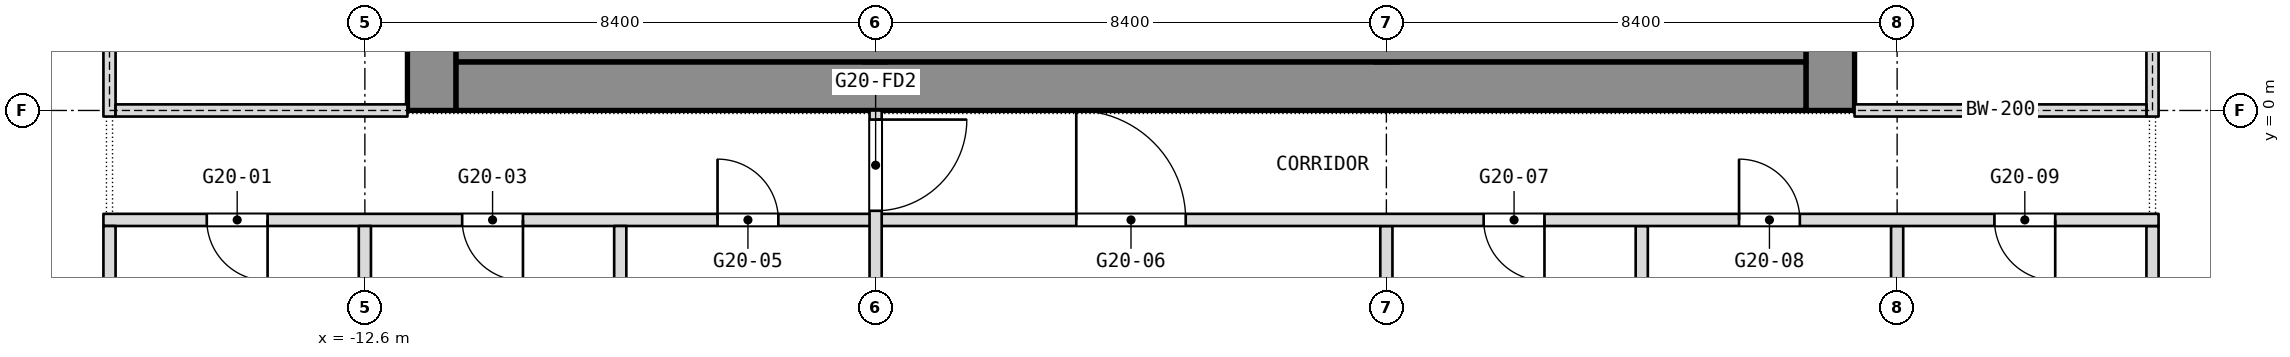
"""IFC4 building model, lengths in metres.
Left out: names, types, materials, properties, quantities, classifications, styles, units other than length and angle.
Written with IfcOpenShell. Run it as: python <this file> out.ifc"""

import sys

from ifc_helpers import new_model, si_unit, direction, frame, frame_2d, origin, place, context, subcontext, project, spatial, rectangle, extrude, element, fill, save


model = new_model("IFC4")
c1 = context("Model", 3, precision=1e-05, world=origin(), true_north=direction((0.0, 1.0)))
c2 = subcontext(c1, "Body", "Model", "MODEL_VIEW")
j1 = project(units=[si_unit("LENGTHUNIT", "METRE"), si_unit("PLANEANGLEUNIT", "RADIAN")], contexts=[c1])
p1 = place(None, origin())
s1 = spatial("IfcSite", under=j1, at=p1, CompositionType="ELEMENT")
p2 = place(p1, origin())
s2 = spatial("IfcBuilding", under=s1, at=p2, CompositionType="ELEMENT")
p3 = place(p2, frame((0.0, 0.0, 238.1)))
s3 = spatial("IfcBuildingStorey", under=s2, at=p3, CompositionType="ELEMENT", Elevation=238.1)
p4 = place(p3, frame((11.5, 0.0, 0.0), z_axis=(0.0, 0.0, 1.0), x_axis=(0.0, 1.0, 0.0)))
e1 = element("IfcWall", 1, at=p4, inside=s3, PredefinedType="SHEAR", context=c2, shape_type="SweptSolid", body=[
    extrude(rectangle(XDim=16.8, YDim=0.8, at=frame_2d((8.4, 0.0))), origin(), (0.0, 0.0, 1.0), 3.6),
])
p5 = place(p4, frame((2.3, 0.0, 0.0)))
e2 = element("IfcOpeningElement", 2, at=p5, cuts=e1, PredefinedType="OPENING", context=c2, shape_type="SweptSolid", body=[
    extrude(rectangle(XDim=1.1, YDim=2.1, at=frame_2d((0.55, 1.05))), frame((0.0, 0.4, 0.0), z_axis=(0.0, -1.0, 0.0), x_axis=(1.0, 0.0, 0.0)), (0.0, 0.0, 1.0), 0.8),
])
p6 = place(p4, frame((4.85, 0.0, 0.0)))
e3 = element("IfcOpeningElement", 3, at=p6, cuts=e1, PredefinedType="OPENING", context=c2, shape_type="SweptSolid", body=[
    extrude(rectangle(XDim=1.1, YDim=2.1, at=frame_2d((0.55, 1.05))), frame((0.0, 0.4, 0.0), z_axis=(0.0, -1.0, 0.0), x_axis=(1.0, 0.0, 0.0)), (0.0, 0.0, 1.0), 0.8),
])
p7 = place(p4, frame((6.825, 0.0, 0.0)))
e4 = element("IfcOpeningElement", 4, at=p7, cuts=e1, PredefinedType="OPENING", context=c2, shape_type="SweptSolid", body=[
    extrude(rectangle(XDim=1.2, YDim=2.1, at=frame_2d((0.6, 1.05))), frame((0.0, 0.4, 0.0), z_axis=(0.0, -1.0, 0.0), x_axis=(1.0, 0.0, 0.0)), (0.0, 0.0, 1.0), 0.8),
])
p8 = place(p4, frame((13.4, 0.0, 0.0)))
e5 = element("IfcOpeningElement", 5, at=p8, cuts=e1, PredefinedType="OPENING", context=c2, shape_type="SweptSolid", body=[
    extrude(rectangle(XDim=1.1, YDim=2.1, at=frame_2d((0.55, 1.05))), frame((0.0, 0.4, 0.0), z_axis=(0.0, -1.0, 0.0), x_axis=(1.0, 0.0, 0.0)), (0.0, 0.0, 1.0), 0.8),
])
p9 = place(p4, frame((10.85, 0.0, 0.0)))
e6 = element("IfcOpeningElement", 6, at=p9, cuts=e1, PredefinedType="OPENING", context=c2, shape_type="SweptSolid", body=[
    extrude(rectangle(XDim=1.1, YDim=2.1, at=frame_2d((0.55, 1.05))), frame((0.0, 0.4, 0.0), z_axis=(0.0, -1.0, 0.0), x_axis=(1.0, 0.0, 0.0)), (0.0, 0.0, 1.0), 0.8),
])
p10 = place(p4, frame((8.775, 0.0, 0.0)))
e7 = element("IfcOpeningElement", 7, at=p10, cuts=e1, PredefinedType="OPENING", context=c2, shape_type="SweptSolid", body=[
    extrude(rectangle(XDim=1.2, YDim=2.1, at=frame_2d((0.6, 1.05))), frame((0.0, 0.4, 0.0), z_axis=(0.0, -1.0, 0.0), x_axis=(1.0, 0.0, 0.0)), (0.0, 0.0, 1.0), 0.8),
])
p11 = place(p3, frame((-11.5, 0.0, 0.0), z_axis=(0.0, 0.0, 1.0), x_axis=(0.0, 1.0, 0.0)))
e8 = element("IfcWall", 8, at=p11, inside=s3, PredefinedType="SHEAR", context=c2, shape_type="SweptSolid", body=[
    extrude(rectangle(XDim=16.8, YDim=0.8, at=frame_2d((8.4, 0.0))), origin(), (0.0, 0.0, 1.0), 3.6),
])
p12 = place(p11, frame((1.837, 0.0, 0.0)))
e9 = element("IfcOpeningElement", 9, at=p12, cuts=e8, PredefinedType="OPENING", context=c2, shape_type="SweptSolid", body=[
    extrude(rectangle(XDim=0.9, YDim=2.1, at=frame_2d((0.45, 1.05))), frame((0.0, 0.4, 0.0), z_axis=(0.0, -1.0, 0.0), x_axis=(1.0, 0.0, 0.0)), (0.0, 0.0, 1.0), 0.8),
])
p13 = place(p11, frame((4.462, 0.0, 0.0)))
e10 = element("IfcOpeningElement", 10, at=p13, cuts=e8, PredefinedType="OPENING", context=c2, shape_type="SweptSolid", body=[
    extrude(rectangle(XDim=0.9, YDim=2.1, at=frame_2d((0.45, 1.05))), frame((0.0, 0.4, 0.0), z_axis=(0.0, -1.0, 0.0), x_axis=(1.0, 0.0, 0.0)), (0.0, 0.0, 1.0), 0.8),
])
p14 = place(p11, frame((6.825, 0.0, 0.0)))
e11 = element("IfcOpeningElement", 11, at=p14, cuts=e8, PredefinedType="OPENING", context=c2, shape_type="SweptSolid", body=[
    extrude(rectangle(XDim=1.2, YDim=2.1, at=frame_2d((0.6, 1.05))), frame((0.0, 0.4, 0.0), z_axis=(0.0, -1.0, 0.0), x_axis=(1.0, 0.0, 0.0)), (0.0, 0.0, 1.0), 0.8),
])
p15 = place(p11, frame((12.3, 0.0, 0.0)))
e12 = element("IfcOpeningElement", 12, at=p15, cuts=e8, PredefinedType="OPENING", context=c2, shape_type="SweptSolid", body=[
    extrude(rectangle(XDim=0.9, YDim=2.1, at=frame_2d((0.45, 1.05))), frame((0.0, 0.4, 0.0), z_axis=(0.0, -1.0, 0.0), x_axis=(1.0, 0.0, 0.0)), (0.0, 0.0, 1.0), 0.8),
])
p16 = place(p11, frame((8.775, 0.0, 0.0)))
e13 = element("IfcOpeningElement", 13, at=p16, cuts=e8, PredefinedType="OPENING", context=c2, shape_type="SweptSolid", body=[
    extrude(rectangle(XDim=1.2, YDim=2.1, at=frame_2d((0.6, 1.05))), frame((0.0, 0.4, 0.0), z_axis=(0.0, -1.0, 0.0), x_axis=(1.0, 0.0, 0.0)), (0.0, 0.0, 1.0), 0.8),
])
p17 = place(p3, frame((-11.1, 0.4, 0.0), z_axis=(0.0, 0.0, 1.0), x_axis=(1.0, 0.0, 0.0)))
e14 = element("IfcWall", 14, at=p17, inside=s3, PredefinedType="SHEAR", context=c2, shape_type="SweptSolid", body=[
    extrude(rectangle(XDim=22.2, YDim=0.8, at=frame_2d((11.1, 0.0))), origin(), (0.0, 0.0, 1.0), 3.6),
])
p18 = place(p3, frame((-4.2, 0.8, 0.0), z_axis=(0.0, 0.0, 1.0), x_axis=(0.0, 1.0, 0.0)))
e15 = element("IfcWall", 15, at=p18, inside=s3, PredefinedType="SHEAR", context=c2, shape_type="SweptSolid", body=[
    extrude(rectangle(XDim=15.2, YDim=0.4, at=frame_2d((7.6, 0.0))), origin(), (0.0, 0.0, 1.0), 3.6),
])
p19 = place(p18, frame((8.5, 0.0, 0.0)))
e16 = element("IfcOpeningElement", 16, at=p19, cuts=e15, PredefinedType="OPENING", context=c2, shape_type="SweptSolid", body=[
    extrude(rectangle(XDim=1.2, YDim=2.1, at=frame_2d((0.6, 1.05))), frame((0.0, 0.2, 0.0), z_axis=(0.0, -1.0, 0.0), x_axis=(1.0, 0.0, 0.0)), (0.0, 0.0, 1.0), 0.4),
])
p20 = place(p3, frame((4.2, 0.8, 0.0), z_axis=(0.0, 0.0, 1.0), x_axis=(0.0, 1.0, 0.0)))
e17 = element("IfcWall", 17, at=p20, inside=s3, PredefinedType="SHEAR", context=c2, shape_type="SweptSolid", body=[
    extrude(rectangle(XDim=15.2, YDim=0.4, at=frame_2d((7.6, 0.0))), origin(), (0.0, 0.0, 1.0), 3.6),
])
p21 = place(p20, frame((5.95, 0.0, 0.0)))
e18 = element("IfcOpeningElement", 18, at=p21, cuts=e17, PredefinedType="OPENING", context=c2, shape_type="SweptSolid", body=[
    extrude(rectangle(XDim=1.2, YDim=2.1, at=frame_2d((0.6, 1.05))), frame((0.0, 0.2, 0.0), z_axis=(0.0, -1.0, 0.0), x_axis=(1.0, 0.0, 0.0)), (0.0, 0.0, 1.0), 0.4),
])
for number, where, z_axis, x_axis in (
    (19, (16.8, -7.8, 0.0), (0.0, 0.0, 1.0), (0.0, 1.0, 0.0)),
    (20, (12.6, -7.8, 0.0), (0.0, 0.0, 1.0), (0.0, 1.0, 0.0)),
):
    element("IfcWall", number, at=place(p3, frame(where, z_axis=z_axis, x_axis=x_axis)), inside=s3, PredefinedType="PARTITIONING", context=c2, shape_type="SweptSolid", body=[
        extrude(rectangle(XDim=5.9, YDim=0.2, at=frame_2d((2.95, 0.0))), origin(), (0.0, 0.0, 1.0), 3.34),
    ])
p22 = place(p3, frame((8.4, -8.0, 0.0), z_axis=(0.0, 0.0, 1.0), x_axis=(0.0, 1.0, 0.0)))
e21 = element("IfcWall", 21, at=p22, inside=s3, PredefinedType="PARTITIONING", context=c2, shape_type="SweptSolid", body=[
    extrude(rectangle(XDim=6.1, YDim=0.2, at=frame_2d((3.05, 0.0))), origin(), (0.0, 0.0, 1.0), 3.34),
])
p23 = place(p3, frame((4.2, -11.6, 0.0), z_axis=(0.0, 0.0, 1.0), x_axis=(0.0, 1.0, 0.0)))
e22 = element("IfcWall", 22, at=p23, inside=s3, PredefinedType="PARTITIONING", context=c2, shape_type="SweptSolid", body=[
    extrude(rectangle(XDim=9.7, YDim=0.2, at=frame_2d((4.85, 0.0))), origin(), (0.0, 0.0, 1.0), 3.34),
])
p24 = place(p3, frame((-16.9, -1.8, 0.0), z_axis=(0.0, 0.0, 1.0), x_axis=(1.0, 0.0, 0.0)))
e23 = element("IfcWall", 23, at=p24, inside=s3, PredefinedType="PARTITIONING", context=c2, shape_type="SweptSolid", body=[
    extrude(rectangle(XDim=33.8, YDim=0.2, at=frame_2d((16.9, 0.0))), origin(), (0.0, 0.0, 1.0), 3.34),
])
p25 = place(p24, frame((1.7, 0.0, 0.0)))
e24 = element("IfcOpeningElement", 24, at=p25, cuts=e23, PredefinedType="OPENING", context=c2, shape_type="SweptSolid", body=[
    extrude(rectangle(XDim=1.0, YDim=2.1, at=frame_2d((0.5, 1.05))), frame((0.0, 0.1, 0.0), z_axis=(0.0, -1.0, 0.0), x_axis=(1.0, 0.0, 0.0)), (0.0, 0.0, 1.0), 0.2),
])
p26 = place(p24, frame((5.9, 0.0, 0.0)))
e25 = element("IfcOpeningElement", 25, at=p26, cuts=e23, PredefinedType="OPENING", context=c2, shape_type="SweptSolid", body=[
    extrude(rectangle(XDim=1.0, YDim=2.1, at=frame_2d((0.5, 1.05))), frame((0.0, 0.1, 0.0), z_axis=(0.0, -1.0, 0.0), x_axis=(1.0, 0.0, 0.0)), (0.0, 0.0, 1.0), 0.2),
])
p27 = place(p24, frame((10.1, 0.0, 0.0)))
e26 = element("IfcOpeningElement", 26, at=p27, cuts=e23, PredefinedType="OPENING", context=c2, shape_type="SweptSolid", body=[
    extrude(rectangle(XDim=1.0, YDim=2.1, at=frame_2d((0.5, 1.05))), frame((0.0, 0.1, 0.0), z_axis=(0.0, -1.0, 0.0), x_axis=(1.0, 0.0, 0.0)), (0.0, 0.0, 1.0), 0.2),
])
p28 = place(p24, frame((16.0, 0.0, 0.0)))
e27 = element("IfcOpeningElement", 27, at=p28, cuts=e23, PredefinedType="OPENING", context=c2, shape_type="SweptSolid", body=[
    extrude(rectangle(XDim=1.8, YDim=2.1, at=frame_2d((0.9, 1.05))), frame((0.0, 0.1, 0.0), z_axis=(0.0, -1.0, 0.0), x_axis=(1.0, 0.0, 0.0)), (0.0, 0.0, 1.0), 0.2),
])
p29 = place(p24, frame((22.7, 0.0, 0.0)))
e28 = element("IfcOpeningElement", 28, at=p29, cuts=e23, PredefinedType="OPENING", context=c2, shape_type="SweptSolid", body=[
    extrude(rectangle(XDim=1.0, YDim=2.1, at=frame_2d((0.5, 1.05))), frame((0.0, 0.1, 0.0), z_axis=(0.0, -1.0, 0.0), x_axis=(1.0, 0.0, 0.0)), (0.0, 0.0, 1.0), 0.2),
])
p30 = place(p24, frame((26.9, 0.0, 0.0)))
e29 = element("IfcOpeningElement", 29, at=p30, cuts=e23, PredefinedType="OPENING", context=c2, shape_type="SweptSolid", body=[
    extrude(rectangle(XDim=1.0, YDim=2.1, at=frame_2d((0.5, 1.05))), frame((0.0, 0.1, 0.0), z_axis=(0.0, -1.0, 0.0), x_axis=(1.0, 0.0, 0.0)), (0.0, 0.0, 1.0), 0.2),
])
p31 = place(p24, frame((31.1, 0.0, 0.0)))
e30 = element("IfcOpeningElement", 30, at=p31, cuts=e23, PredefinedType="OPENING", context=c2, shape_type="SweptSolid", body=[
    extrude(rectangle(XDim=1.0, YDim=2.1, at=frame_2d((0.5, 1.05))), frame((0.0, 0.1, 0.0), z_axis=(0.0, -1.0, 0.0), x_axis=(1.0, 0.0, 0.0)), (0.0, 0.0, 1.0), 0.2),
])
p32 = place(p3, frame((-4.2, -13.6, 0.0), z_axis=(0.0, 0.0, 1.0), x_axis=(0.0, 1.0, 0.0)))
e31 = element("IfcWall", 31, at=p32, inside=s3, PredefinedType="PARTITIONING", context=c2, shape_type="SweptSolid", body=[
    extrude(rectangle(XDim=13.6, YDim=0.2, at=frame_2d((6.8, 0.0))), origin(), (0.0, 0.0, 1.0), 3.34),
])
p33 = place(p32, frame((11.95, 0.0, 0.0)))
e32 = element("IfcOpeningElement", 32, at=p33, cuts=e31, PredefinedType="OPENING", context=c2, shape_type="SweptSolid", body=[
    extrude(rectangle(XDim=1.5, YDim=2.1, at=frame_2d((0.75, 1.05))), frame((0.0, 0.1, 0.0), z_axis=(0.0, -1.0, 0.0), x_axis=(1.0, 0.0, 0.0)), (0.0, 0.0, 1.0), 0.2),
])
p34 = place(p32, frame((0.25, 0.0, 0.0)))
e33 = element("IfcOpeningElement", 33, at=p34, cuts=e31, PredefinedType="OPENING", context=c2, shape_type="SweptSolid", body=[
    extrude(rectangle(XDim=1.5, YDim=2.1, at=frame_2d((0.75, 1.05))), frame((0.0, 0.1, 0.0), z_axis=(0.0, -1.0, 0.0), x_axis=(1.0, 0.0, 0.0)), (0.0, 0.0, 1.0), 0.2),
])
p35 = place(p3, frame((-8.4, -8.0, 0.0), z_axis=(0.0, 0.0, 1.0), x_axis=(0.0, 1.0, 0.0)))
e34 = element("IfcWall", 34, at=p35, inside=s3, PredefinedType="PARTITIONING", context=c2, shape_type="SweptSolid", body=[
    extrude(rectangle(XDim=6.1, YDim=0.2, at=frame_2d((3.05, 0.0))), origin(), (0.0, 0.0, 1.0), 3.34),
])
p36 = place(p3, frame((-12.6, -7.8, 0.0), z_axis=(0.0, 0.0, 1.0), x_axis=(0.0, 1.0, 0.0)))
e35 = element("IfcWall", 35, at=p36, inside=s3, PredefinedType="PARTITIONING", context=c2, shape_type="SweptSolid", body=[
    extrude(rectangle(XDim=5.9, YDim=0.2, at=frame_2d((2.95, 0.0))), origin(), (0.0, 0.0, 1.0), 3.34),
])
p37 = place(p3, frame((-16.8, -8.0, 0.0), z_axis=(0.0, 0.0, 1.0), x_axis=(0.0, 1.0, 0.0)))
e36 = element("IfcWall", 36, at=p37, inside=s3, PredefinedType="PARTITIONING", context=c2, shape_type="SweptSolid", body=[
    extrude(rectangle(XDim=6.1, YDim=0.2, at=frame_2d((3.05, 0.0))), origin(), (0.0, 0.0, 1.0), 3.34),
])
p38 = place(p3, frame((-11.1, 1.15, 0.0), z_axis=(0.0, 0.0, 1.0), x_axis=(1.0, 0.0, 0.0)))
e37 = element("IfcWall", 37, at=p38, inside=s3, PredefinedType="PARTITIONING", context=c2, shape_type="SweptSolid", body=[
    extrude(rectangle(XDim=22.2, YDim=0.7, at=frame_2d((11.1, 0.0))), origin(), (0.0, 0.0, 1.0), 3.34),
])
p39 = place(p3, frame((-16.8, -0.1, 0.0), z_axis=(0.0, 0.0, 1.0), x_axis=(0.0, 1.0, 0.0)))
e38 = element("IfcWall", 38, at=p39, inside=s3, PredefinedType="PARTITIONING", context=c2, shape_type="SweptSolid", body=[
    extrude(rectangle(XDim=17.0, YDim=0.2, at=frame_2d((8.5, 0.0))), origin(), (0.0, 0.0, 1.0), 3.34),
])
p40 = place(p39, frame((2.2, 0.0, 0.0)))
e39 = element("IfcOpeningElement", 39, at=p40, cuts=e38, PredefinedType="OPENING", context=c2, shape_type="SweptSolid", body=[
    extrude(rectangle(XDim=1.8, YDim=2.1, at=frame_2d((0.9, 1.05))), frame((0.0, 0.1, 0.0), z_axis=(0.0, -1.0, 0.0), x_axis=(1.0, 0.0, 0.0)), (0.0, 0.0, 1.0), 0.2),
])
p41 = place(p39, frame((13.0, 0.0, 0.0)))
e40 = element("IfcOpeningElement", 40, at=p41, cuts=e38, PredefinedType="OPENING", context=c2, shape_type="SweptSolid", body=[
    extrude(rectangle(XDim=1.8, YDim=2.1, at=frame_2d((0.9, 1.05))), frame((0.0, 0.1, 0.0), z_axis=(0.0, -1.0, 0.0), x_axis=(1.0, 0.0, 0.0)), (0.0, 0.0, 1.0), 0.2),
])
p42 = place(p3, frame((-16.7, 0.0, 0.0), z_axis=(0.0, 0.0, 1.0), x_axis=(1.0, 0.0, 0.0)))
e41 = element("IfcWall", 41, at=p42, inside=s3, PredefinedType="PARTITIONING", context=c2, shape_type="SweptSolid", body=[
    extrude(rectangle(XDim=4.8, YDim=0.2, at=frame_2d((2.4, 0.0))), origin(), (0.0, 0.0, 1.0), 2.94),
])
p43 = place(p3, frame((16.8, -0.1, 0.0), z_axis=(0.0, 0.0, 1.0), x_axis=(0.0, 1.0, 0.0)))
e42 = element("IfcWall", 42, at=p43, inside=s3, PredefinedType="PARTITIONING", context=c2, shape_type="SweptSolid", body=[
    extrude(rectangle(XDim=17.0, YDim=0.2, at=frame_2d((8.5, 0.0))), origin(), (0.0, 0.0, 1.0), 3.34),
])
p44 = place(p43, frame((2.2, 0.0, 0.0)))
e43 = element("IfcOpeningElement", 43, at=p44, cuts=e42, PredefinedType="OPENING", context=c2, shape_type="SweptSolid", body=[
    extrude(rectangle(XDim=1.8, YDim=2.1, at=frame_2d((0.9, 1.05))), frame((0.0, 0.1, 0.0), z_axis=(0.0, -1.0, 0.0), x_axis=(1.0, 0.0, 0.0)), (0.0, 0.0, 1.0), 0.2),
])
p45 = place(p43, frame((13.0, 0.0, 0.0)))
e44 = element("IfcOpeningElement", 44, at=p45, cuts=e42, PredefinedType="OPENING", context=c2, shape_type="SweptSolid", body=[
    extrude(rectangle(XDim=1.8, YDim=2.1, at=frame_2d((0.9, 1.05))), frame((0.0, 0.1, 0.0), z_axis=(0.0, -1.0, 0.0), x_axis=(1.0, 0.0, 0.0)), (0.0, 0.0, 1.0), 0.2),
])
p46 = place(p3, frame((11.9, 0.0, 0.0), z_axis=(0.0, 0.0, 1.0), x_axis=(1.0, 0.0, 0.0)))
e45 = element("IfcWall", 45, at=p46, inside=s3, PredefinedType="PARTITIONING", context=c2, shape_type="SweptSolid", body=[
    extrude(rectangle(XDim=4.8, YDim=0.2, at=frame_2d((2.4, 0.0))), origin(), (0.0, 0.0, 1.0), 2.94),
])
p47 = place(p25, origin())
e46 = element("IfcDoor", 46, at=p47, inside=s3, OperationType="SINGLE_SWING_LEFT", PredefinedType="DOOR", context=c2, shape_type="SweptSolid", body=[
    extrude(rectangle(XDim=1.0, YDim=2.1, at=frame_2d((0.5, 1.05))), frame((0.0, 0.025, 0.0), z_axis=(0.0, -1.0, 0.0), x_axis=(1.0, 0.0, 0.0)), (0.0, 0.0, 1.0), 0.05),
])
fill(e24, e46)
p48 = place(p26, origin())
e47 = element("IfcDoor", 47, at=p48, inside=s3, OperationType="SINGLE_SWING_LEFT", PredefinedType="DOOR", context=c2, shape_type="SweptSolid", body=[
    extrude(rectangle(XDim=1.0, YDim=2.1, at=frame_2d((0.5, 1.05))), frame((0.0, 0.025, 0.0), z_axis=(0.0, -1.0, 0.0), x_axis=(1.0, 0.0, 0.0)), (0.0, 0.0, 1.0), 0.05),
])
fill(e25, e47)
p49 = place(p27, origin())
e48 = element("IfcDoor", 48, at=p49, inside=s3, OperationType="SINGLE_SWING_RIGHT", PredefinedType="DOOR", context=c2, shape_type="SweptSolid", body=[
    extrude(rectangle(XDim=1.0, YDim=2.1, at=frame_2d((0.5, 1.05))), frame((0.0, 0.025, 0.0), z_axis=(0.0, -1.0, 0.0), x_axis=(1.0, 0.0, 0.0)), (0.0, 0.0, 1.0), 0.05),
])
fill(e26, e48)
p50 = place(p28, origin())
e49 = element("IfcDoor", 49, at=p50, inside=s3, OperationType="DOUBLE_DOOR_SINGLE_SWING", PredefinedType="DOOR", context=c2, shape_type="SweptSolid", body=[
    extrude(rectangle(XDim=1.8, YDim=2.1, at=frame_2d((0.9, 1.05))), frame((0.0, 0.025, 0.0), z_axis=(0.0, -1.0, 0.0), x_axis=(1.0, 0.0, 0.0)), (0.0, 0.0, 1.0), 0.05),
])
fill(e27, e49)
p51 = place(p29, origin())
e50 = element("IfcDoor", 50, at=p51, inside=s3, OperationType="SINGLE_SWING_RIGHT", PredefinedType="DOOR", context=c2, shape_type="SweptSolid", body=[
    extrude(rectangle(XDim=1.0, YDim=2.1, at=frame_2d((0.5, 1.05))), frame((0.0, 0.025, 0.0), z_axis=(0.0, -1.0, 0.0), x_axis=(1.0, 0.0, 0.0)), (0.0, 0.0, 1.0), 0.05),
])
fill(e28, e50)
p52 = place(p30, origin())
e51 = element("IfcDoor", 51, at=p52, inside=s3, OperationType="SINGLE_SWING_LEFT", PredefinedType="DOOR", context=c2, shape_type="SweptSolid", body=[
    extrude(rectangle(XDim=1.0, YDim=2.1, at=frame_2d((0.5, 1.05))), frame((0.0, 0.025, 0.0), z_axis=(0.0, -1.0, 0.0), x_axis=(1.0, 0.0, 0.0)), (0.0, 0.0, 1.0), 0.05),
])
fill(e29, e51)
p53 = place(p31, origin())
e52 = element("IfcDoor", 52, at=p53, inside=s3, OperationType="SINGLE_SWING_RIGHT", PredefinedType="DOOR", context=c2, shape_type="SweptSolid", body=[
    extrude(rectangle(XDim=1.0, YDim=2.1, at=frame_2d((0.5, 1.05))), frame((0.0, 0.025, 0.0), z_axis=(0.0, -1.0, 0.0), x_axis=(1.0, 0.0, 0.0)), (0.0, 0.0, 1.0), 0.05),
])
fill(e30, e52)
p54 = place(p33, origin())
e53 = element("IfcDoor", 53, at=p54, inside=s3, OperationType="DOUBLE_DOOR_DOUBLE_SWING", PredefinedType="DOOR", context=c2, shape_type="SweptSolid", body=[
    extrude(rectangle(XDim=1.5, YDim=2.1, at=frame_2d((0.75, 1.05))), frame((0.0, 0.025, 0.0), z_axis=(0.0, -1.0, 0.0), x_axis=(1.0, 0.0, 0.0)), (0.0, 0.0, 1.0), 0.05),
])
fill(e32, e53)
save(model, sys.argv[1])
